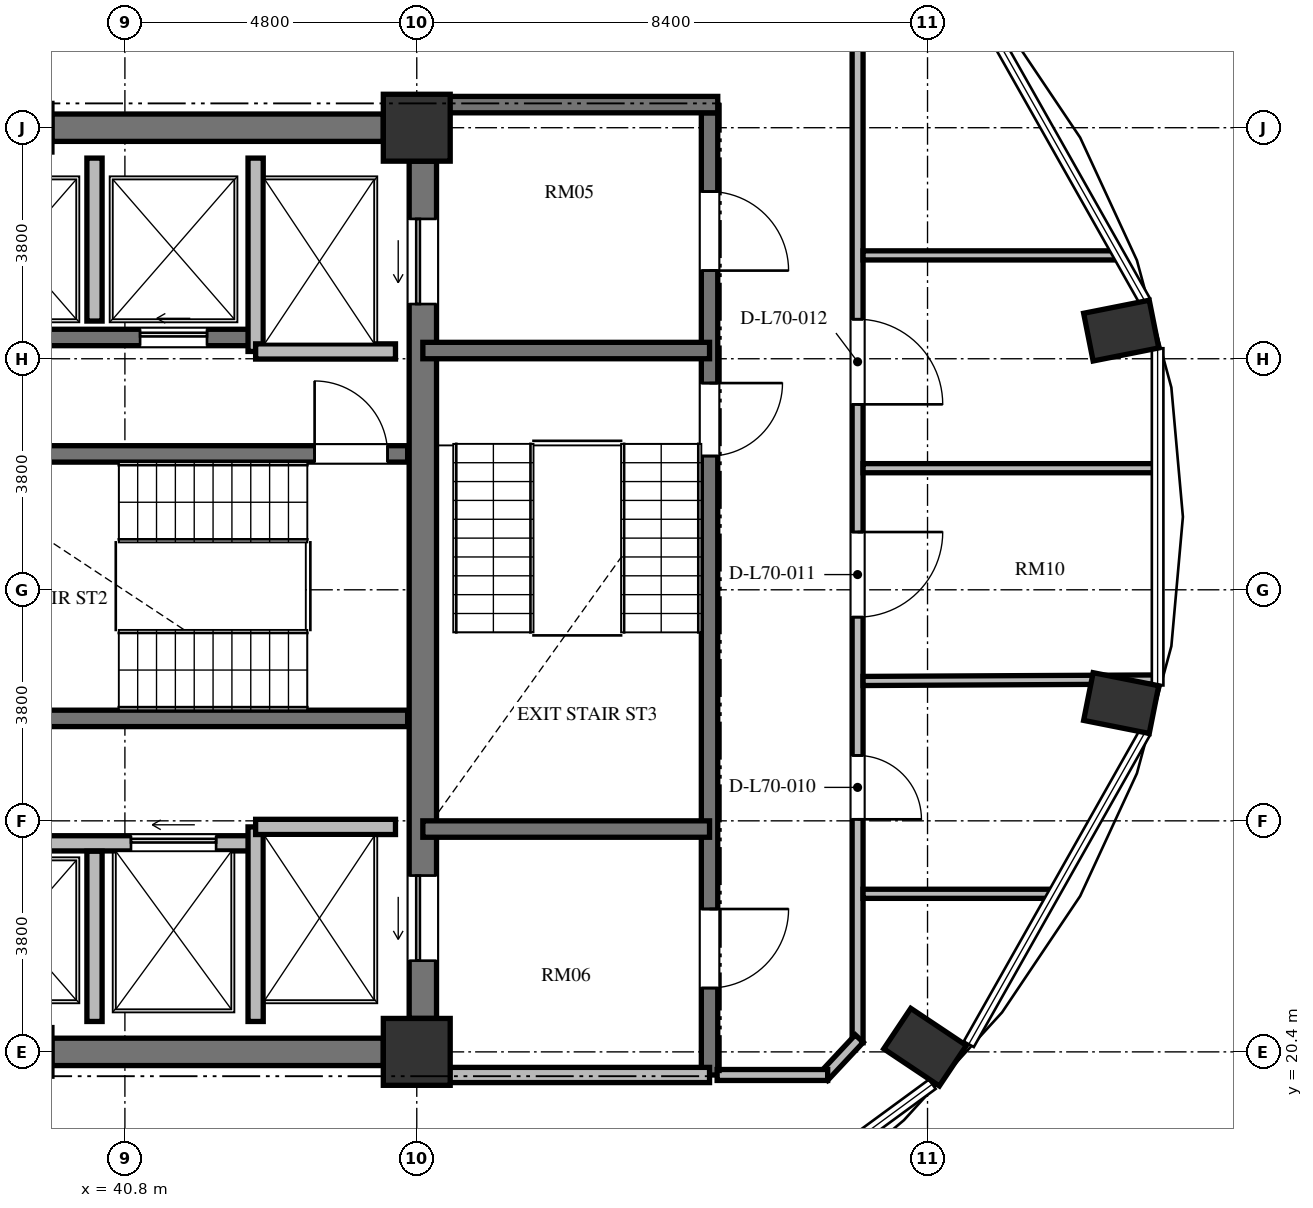
"""IFC4 building model, lengths in metres.
Left out: names, types, materials, properties, quantities, classifications, styles, units other than length and angle.
Written with IfcOpenShell. Run it as: python <this file> out.ifc"""

import sys

from ifc_helpers import new_model, si_unit, direction, frame, frame_2d, origin, origin_2d, place, context, subcontext, project, spatial, rectangle, extrude, element, fill, save


model = new_model("IFC4")
c1 = context("Model", 3, precision=1e-05, world=origin(), true_north=direction((0.0, 1.0)))
c2 = subcontext(c1, "Body", "Model", "MODEL_VIEW")
j1 = project(units=[si_unit("LENGTHUNIT", "METRE"), si_unit("PLANEANGLEUNIT", "RADIAN")], contexts=[c1])
p1 = place(None, origin())
s1 = spatial("IfcSite", under=j1, at=p1, CompositionType="ELEMENT")
p2 = place(p1, origin())
s2 = spatial("IfcBuilding", under=s1, at=p2, CompositionType="ELEMENT")
p3 = place(p2, frame((0.0, 0.0, 269.616)))
s3 = spatial("IfcBuildingStorey", under=s2, at=p3, CompositionType="ELEMENT", Elevation=269.616)
for number, where, z_axis, x_axis in (
    (1, (53.96, 20.478, 0.0), (0.0, 0.0, 1.0), (0.831, -0.556, 0.0)),
    (2, (57.185, 26.137, 0.0), (0.0, 0.0, 1.0), (0.981, -0.195, 0.0)),
    (3, (57.185, 32.263, 0.0), (0.0, 0.0, 1.0), (0.981, 0.195, 0.0)),
):
    element("IfcColumn", number, at=place(p3, frame(where, z_axis=z_axis, x_axis=x_axis)), inside=s3, PredefinedType="COLUMN", context=c2, shape_type="SweptSolid", body=[
        extrude(rectangle(XDim=1.1, YDim=0.8, at=origin_2d()), origin(), (0.0, 0.0, 1.0), 3.648),
    ])
for number, where, z_axis, x_axis in (
    (4, (45.6, 20.4, 0.0), (0.0, 0.0, 1.0), (1.0, 0.0, 0.0)),
    (5, (45.6, 35.6, 0.0), (0.0, 0.0, 1.0), (1.0, 0.0, 0.0)),
):
    element("IfcColumn", number, at=place(p3, frame(where, z_axis=z_axis, x_axis=x_axis)), inside=s3, PredefinedType="COLUMN", context=c2, shape_type="SweptSolid", body=[
        extrude(rectangle(XDim=1.1, YDim=1.1, at=origin_2d()), origin(), (0.0, 0.0, 1.0), 3.648),
    ])
p4 = place(p3, frame((45.7, 20.95, 0.0), z_axis=(0.0, 0.0, 1.0), x_axis=(0.0, 1.0, 0.0)))
e6 = element("IfcWall", 6, at=p4, inside=s3, PredefinedType="SHEAR", context=c2, shape_type="SweptSolid", body=[
    extrude(rectangle(XDim=14.1, YDim=0.45, at=frame_2d((7.05, 0.0))), origin(), (0.0, 0.0, 1.0), 3.648),
])
p5 = place(p4, frame((11.75, 0.0, 0.0)))
e7 = element("IfcOpeningElement", 7, at=p5, cuts=e6, PredefinedType="OPENING", context=c2, shape_type="SweptSolid", body=[
    extrude(rectangle(XDim=1.4, YDim=2.3, at=frame_2d((0.7, 1.15))), frame((0.0, 0.235, 0.0), z_axis=(0.0, -1.0, 0.0), x_axis=(1.0, 0.0, 0.0)), (0.0, 0.0, 1.0), 0.47),
])
p6 = place(p4, frame((0.95, 0.0, 0.0)))
e8 = element("IfcOpeningElement", 8, at=p6, cuts=e6, PredefinedType="OPENING", context=c2, shape_type="SweptSolid", body=[
    extrude(rectangle(XDim=1.4, YDim=2.3, at=frame_2d((0.7, 1.15))), frame((0.0, 0.235, 0.0), z_axis=(0.0, -1.0, 0.0), x_axis=(1.0, 0.0, 0.0)), (0.0, 0.0, 1.0), 0.47),
])
for number, where, z_axis, x_axis in (
    (9, (39.6, 20.4, 0.0), (0.0, 0.0, 1.0), (1.0, 0.0, 0.0)),
    (10, (39.6, 35.6, 0.0), (0.0, 0.0, 1.0), (1.0, 0.0, 0.0)),
):
    element("IfcWall", number, at=place(p3, frame(where, z_axis=z_axis, x_axis=x_axis)), inside=s3, PredefinedType="SHEAR", context=c2, shape_type="SweptSolid", body=[
        extrude(rectangle(XDim=5.45, YDim=0.45, at=frame_2d((2.725, 0.0))), origin(), (0.0, 0.0, 1.0), 3.648),
    ])
p7 = place(p3, frame((37.465, 30.235, 0.0), z_axis=(0.0, 0.0, 1.0), x_axis=(1.0, 0.0, 0.0)))
e11 = element("IfcWall", 11, at=p7, inside=s3, PredefinedType="SHEAR", context=c2, shape_type="SweptSolid", body=[
    extrude(rectangle(XDim=7.985, YDim=0.27, at=frame_2d((3.992, 0.0))), origin(), (0.0, 0.0, 1.0), 3.648),
])
p8 = place(p7, frame((6.455, 0.0, 0.0)))
e12 = element("IfcOpeningElement", 12, at=p8, cuts=e11, PredefinedType="OPENING", context=c2, shape_type="SweptSolid", body=[
    extrude(rectangle(XDim=1.2, YDim=2.15, at=frame_2d((0.6, 1.075))), frame((0.0, 0.145, 0.0), z_axis=(0.0, -1.0, 0.0), x_axis=(1.0, 0.0, 0.0)), (0.0, 0.0, 1.0), 0.29),
])
p9 = place(p3, frame((37.465, 25.885, 0.0), z_axis=(0.0, 0.0, 1.0), x_axis=(1.0, 0.0, 0.0)))
e13 = element("IfcWall", 13, at=p9, inside=s3, PredefinedType="SHEAR", context=c2, shape_type="SweptSolid", body=[
    extrude(rectangle(XDim=7.985, YDim=0.27, at=frame_2d((3.992, 0.0))), origin(), (0.0, 0.0, 1.0), 3.648),
])
p10 = place(p3, frame((26.55, 32.15, 0.0), z_axis=(0.0, 0.0, 1.0), x_axis=(1.0, 0.0, 0.0)))
e14 = element("IfcWall", 14, at=p10, inside=s3, PredefinedType="SHEAR", context=c2, shape_type="SweptSolid", body=[
    extrude(rectangle(XDim=16.4, YDim=0.27, at=frame_2d((8.2, 0.0))), origin(), (0.0, 0.0, 1.0), 3.648),
])
p11 = place(p10, frame((5.125, 0.0, 0.0)))
e15 = element("IfcOpeningElement", 15, at=p11, cuts=e14, PredefinedType="OPENING", context=c2, shape_type="SweptSolid", body=[
    extrude(rectangle(XDim=1.05, YDim=2.15, at=frame_2d((0.525, 1.075))), frame((0.0, 0.145, 0.0), z_axis=(0.0, -1.0, 0.0), x_axis=(1.0, 0.0, 0.0)), (0.0, 0.0, 1.0), 0.29),
])
p12 = place(p10, frame((11.9, 0.0, 0.0)))
e16 = element("IfcOpeningElement", 16, at=p12, cuts=e14, PredefinedType="OPENING", context=c2, shape_type="SweptSolid", body=[
    extrude(rectangle(XDim=1.1, YDim=2.2, at=frame_2d((0.55, 1.1))), frame((0.0, 0.145, 0.0), z_axis=(0.0, -1.0, 0.0), x_axis=(1.0, 0.0, 0.0)), (0.0, 0.0, 1.0), 0.29),
])
p13 = place(p10, frame((14.5, 0.0, 0.0)))
e17 = element("IfcOpeningElement", 17, at=p13, cuts=e14, PredefinedType="OPENING", context=c2, shape_type="SweptSolid", body=[
    extrude(rectangle(XDim=1.1, YDim=2.2, at=frame_2d((0.55, 1.1))), frame((0.0, 0.145, 0.0), z_axis=(0.0, -1.0, 0.0), x_axis=(1.0, 0.0, 0.0)), (0.0, 0.0, 1.0), 0.29),
])
p14 = place(p3, frame((26.75, 23.83, 0.0), z_axis=(0.0, 0.0, 1.0), x_axis=(1.0, 0.0, 0.0)))
e18 = element("IfcWall", 18, at=p14, inside=s3, PredefinedType="SOLIDWALL", context=c2, shape_type="SweptSolid", body=[
    extrude(rectangle(XDim=16.2, YDim=0.25, at=frame_2d((8.1, 0.0))), origin(), (0.0, 0.0, 1.0), 3.448),
])
p15 = place(p14, frame((4.75, 0.0, 0.0)))
e19 = element("IfcOpeningElement", 19, at=p15, cuts=e18, PredefinedType="OPENING", context=c2, shape_type="SweptSolid", body=[
    extrude(rectangle(XDim=1.4, YDim=2.2, at=frame_2d((0.7, 1.1))), frame((0.0, 0.135, 0.0), z_axis=(0.0, -1.0, 0.0), x_axis=(1.0, 0.0, 0.0)), (0.0, 0.0, 1.0), 0.27),
])
p16 = place(p14, frame((11.7, 0.0, 0.0)))
e20 = element("IfcOpeningElement", 20, at=p16, cuts=e18, PredefinedType="OPENING", context=c2, shape_type="SweptSolid", body=[
    extrude(rectangle(XDim=1.1, YDim=2.2, at=frame_2d((0.55, 1.1))), frame((0.0, 0.135, 0.0), z_axis=(0.0, -1.0, 0.0), x_axis=(1.0, 0.0, 0.0)), (0.0, 0.0, 1.0), 0.27),
])
p17 = place(p14, frame((14.15, 0.0, 0.0)))
e21 = element("IfcOpeningElement", 21, at=p17, cuts=e18, PredefinedType="OPENING", context=c2, shape_type="SweptSolid", body=[
    extrude(rectangle(XDim=1.4, YDim=2.3, at=frame_2d((0.7, 1.15))), frame((0.0, 0.135, 0.0), z_axis=(0.0, -1.0, 0.0), x_axis=(1.0, 0.0, 0.0)), (0.0, 0.0, 1.0), 0.27),
])
p18 = place(p3, frame((42.95, 31.92, 0.0), z_axis=(0.0, 0.0, 1.0), x_axis=(0.0, 1.0, 0.0)))
e22 = element("IfcWall", 22, at=p18, inside=s3, PredefinedType="SOLIDWALL", context=c2, shape_type="SweptSolid", body=[
    extrude(rectangle(XDim=3.18, YDim=0.25, at=frame_2d((1.59, 0.0))), origin(), (0.0, 0.0, 1.0), 3.448),
])
p19 = place(p3, frame((42.95, 31.92, 0.0), z_axis=(0.0, 0.0, 1.0), x_axis=(1.0, 0.0, 0.0)))
e23 = element("IfcWall", 23, at=p19, inside=s3, PredefinedType="SOLIDWALL", context=c2, shape_type="SweptSolid", body=[
    extrude(rectangle(XDim=2.3, YDim=0.25, at=frame_2d((1.15, 0.0))), origin(), (0.0, 0.0, 1.0), 3.448),
])
p20 = place(p3, frame((42.95, 20.9, 0.0), z_axis=(0.0, 0.0, 1.0), x_axis=(0.0, 1.0, 0.0)))
e24 = element("IfcWall", 24, at=p20, inside=s3, PredefinedType="SOLIDWALL", context=c2, shape_type="SweptSolid", body=[
    extrude(rectangle(XDim=3.2, YDim=0.25, at=frame_2d((1.6, 0.0))), origin(), (0.0, 0.0, 1.0), 3.448),
])
p21 = place(p3, frame((42.95, 24.1, 0.0), z_axis=(0.0, 0.0, 1.0), x_axis=(1.0, 0.0, 0.0)))
e25 = element("IfcWall", 25, at=p21, inside=s3, PredefinedType="SOLIDWALL", context=c2, shape_type="SweptSolid", body=[
    extrude(rectangle(XDim=2.3, YDim=0.25, at=frame_2d((1.15, 0.0))), origin(), (0.0, 0.0, 1.0), 3.448),
])
p22 = place(p3, frame((40.3, 32.42, 0.0), z_axis=(0.0, 0.0, 1.0), x_axis=(0.0, 1.0, 0.0)))
e26 = element("IfcWall", 26, at=p22, inside=s3, PredefinedType="SOLIDWALL", context=c2, shape_type="SweptSolid", body=[
    extrude(rectangle(XDim=2.68, YDim=0.25, at=frame_2d((1.34, 0.0))), origin(), (0.0, 0.0, 1.0), 3.448),
])
p23 = place(p3, frame((40.3, 20.9, 0.0), z_axis=(0.0, 0.0, 1.0), x_axis=(0.0, 1.0, 0.0)))
e27 = element("IfcWall", 27, at=p23, inside=s3, PredefinedType="SOLIDWALL", context=c2, shape_type="SweptSolid", body=[
    extrude(rectangle(XDim=2.8, YDim=0.25, at=frame_2d((1.4, 0.0))), origin(), (0.0, 0.0, 1.0), 3.448),
])
p24 = place(p3, frame((50.415, 35.845, 0.0), z_axis=(0.0, 0.0, 1.0), x_axis=(0.0, -1.0, 0.0)))
e28 = element("IfcWall", 28, at=p24, inside=s3, PredefinedType="SHEAR", context=c2, shape_type="SweptSolid", body=[
    extrude(rectangle(XDim=15.825, YDim=0.27, at=frame_2d((7.913, 0.0))), origin(), (0.0, 0.0, 1.0), 3.648),
])
p25 = place(p24, frame((4.445, 0.0, 0.0)))
e29 = element("IfcOpeningElement", 29, at=p25, cuts=e28, PredefinedType="OPENING", context=c2, shape_type="SweptSolid", body=[
    extrude(rectangle(XDim=1.2, YDim=2.15, at=frame_2d((0.6, 1.075))), frame((0.0, 0.145, 0.0), z_axis=(0.0, -1.0, 0.0), x_axis=(1.0, 0.0, 0.0)), (0.0, 0.0, 1.0), 0.29),
])
p26 = place(p24, frame((1.295, 0.0, 0.0)))
e30 = element("IfcOpeningElement", 30, at=p26, cuts=e28, PredefinedType="OPENING", context=c2, shape_type="SweptSolid", body=[
    extrude(rectangle(XDim=1.3, YDim=2.2, at=frame_2d((0.65, 1.1))), frame((0.0, 0.145, 0.0), z_axis=(0.0, -1.0, 0.0), x_axis=(1.0, 0.0, 0.0)), (0.0, 0.0, 1.0), 0.29),
])
p27 = place(p24, frame((13.095, 0.0, 0.0)))
e31 = element("IfcOpeningElement", 31, at=p27, cuts=e28, PredefinedType="OPENING", context=c2, shape_type="SweptSolid", body=[
    extrude(rectangle(XDim=1.3, YDim=2.2, at=frame_2d((0.65, 1.1))), frame((0.0, 0.145, 0.0), z_axis=(0.0, -1.0, 0.0), x_axis=(1.0, 0.0, 0.0)), (0.0, 0.0, 1.0), 0.29),
])
p28 = place(p3, frame((45.925, 35.98, 0.0), z_axis=(0.0, 0.0, 1.0), x_axis=(1.0, 0.0, 0.0)))
e32 = element("IfcWall", 32, at=p28, inside=s3, PredefinedType="SHEAR", context=c2, shape_type="SweptSolid", body=[
    extrude(rectangle(XDim=4.625, YDim=0.27, at=frame_2d((2.312, 0.0))), origin(), (0.0, 0.0, 1.0), 3.648),
])
for number, where, z_axis, x_axis in (
    (33, (45.7, 31.935, 0.0), (0.0, 0.0, 1.0), (1.0, 0.0, 0.0)),
    (34, (45.7, 24.065, 0.0), (0.0, 0.0, 1.0), (1.0, 0.0, 0.0)),
):
    element("IfcWall", number, at=place(p3, frame(where, z_axis=z_axis, x_axis=x_axis)), inside=s3, PredefinedType="SHEAR", context=c2, shape_type="SweptSolid", body=[
        extrude(rectangle(XDim=4.715, YDim=0.27, at=frame_2d((2.357, 0.0))), origin(), (0.0, 0.0, 1.0), 3.648),
    ])
p29 = place(p3, frame((45.7, 20.02, 0.0), z_axis=(0.0, 0.0, 1.0), x_axis=(1.0, 0.0, 0.0)))
e35 = element("IfcWall", 35, at=p29, inside=s3, PredefinedType="SOLIDWALL", context=c2, shape_type="SweptSolid", body=[
    extrude(rectangle(XDim=4.715, YDim=0.25, at=frame_2d((2.357, 0.0))), origin(), (0.0, 0.0, 1.0), 3.448),
])
p30 = place(p3, frame((52.85, 37.85, 0.0), z_axis=(0.0, 0.0, 1.0), x_axis=(0.0, -1.0, 0.0)))
e36 = element("IfcWall", 36, at=p30, inside=s3, PredefinedType="PARTITIONING", context=c2, shape_type="SweptSolid", body=[
    extrude(rectangle(XDim=17.3, YDim=0.18, at=frame_2d((8.65, 0.0))), origin(), (0.0, 0.0, 1.0), 3.448),
])
p31 = place(p30, frame((12.575, 0.0, 0.0)))
e37 = element("IfcOpeningElement", 37, at=p31, cuts=e36, PredefinedType="OPENING", context=c2, shape_type="SweptSolid", body=[
    extrude(rectangle(XDim=1.05, YDim=2.15, at=frame_2d((0.525, 1.075))), frame((0.0, 0.1, 0.0), z_axis=(0.0, -1.0, 0.0), x_axis=(1.0, 0.0, 0.0)), (0.0, 0.0, 1.0), 0.2),
])
p32 = place(p30, frame((8.9, 0.0, 0.0)))
e38 = element("IfcOpeningElement", 38, at=p32, cuts=e36, PredefinedType="OPENING", context=c2, shape_type="SweptSolid", body=[
    extrude(rectangle(XDim=1.4, YDim=2.2, at=frame_2d((0.7, 1.1))), frame((0.0, 0.1, 0.0), z_axis=(0.0, -1.0, 0.0), x_axis=(1.0, 0.0, 0.0)), (0.0, 0.0, 1.0), 0.2),
])
p33 = place(p30, frame((5.4, 0.0, 0.0)))
e39 = element("IfcOpeningElement", 39, at=p33, cuts=e36, PredefinedType="OPENING", context=c2, shape_type="SweptSolid", body=[
    extrude(rectangle(XDim=1.4, YDim=2.2, at=frame_2d((0.7, 1.1))), frame((0.0, 0.1, 0.0), z_axis=(0.0, -1.0, 0.0), x_axis=(1.0, 0.0, 0.0)), (0.0, 0.0, 1.0), 0.2),
])
p34 = place(p3, frame((52.877, 20.619, 0.0), z_axis=(0.0, 0.0, 1.0), x_axis=(-0.682409308253, -0.730970270264, 0.0)))
e40 = element("IfcWall", 40, at=p34, inside=s3, PredefinedType="PARTITIONING", context=c2, shape_type="SweptSolid", body=[
    extrude(rectangle(XDim=0.86, YDim=0.18, at=frame_2d((0.43, 0.0))), origin(), (0.0, 0.0, 1.0), 3.448),
])
p35 = place(p3, frame((52.358, 20.02, 0.0), z_axis=(0.0, 0.0, 1.0), x_axis=(-1.0, 0.0, 0.0)))
e41 = element("IfcWall", 41, at=p35, inside=s3, PredefinedType="PARTITIONING", context=c2, shape_type="SweptSolid", body=[
    extrude(rectangle(XDim=1.818, YDim=0.18, at=frame_2d((0.909, 0.0))), origin(), (0.0, 0.0, 1.0), 3.448),
])
p36 = place(p3, frame((52.94, 23.0, 0.0), z_axis=(0.0, 0.0, 1.0), x_axis=(1.0, 0.0, 0.0)))
e42 = element("IfcWall", 42, at=p36, inside=s3, PredefinedType="PARTITIONING", context=c2, shape_type="SweptSolid", body=[
    extrude(rectangle(XDim=3.126, YDim=0.15, at=frame_2d((1.563, 0.0))), origin(), (0.0, 0.0, 1.0), 3.448),
])
p37 = place(p3, frame((52.94, 26.5, 0.0), z_axis=(0.0, 0.0, 1.0), x_axis=(0.999987566883, 0.004986589892, 0.0)))
e43 = element("IfcWall", 43, at=p37, inside=s3, PredefinedType="PARTITIONING", context=c2, shape_type="SweptSolid", body=[
    extrude(rectangle(XDim=4.847, YDim=0.15, at=frame_2d((2.423, 0.0))), origin(), (0.0, 0.0, 1.0), 3.448),
])
p38 = place(p3, frame((52.94, 30.0, 0.0), z_axis=(0.0, 0.0, 1.0), x_axis=(1.0, 0.0, 0.0)))
e44 = element("IfcWall", 44, at=p38, inside=s3, PredefinedType="PARTITIONING", context=c2, shape_type="SweptSolid", body=[
    extrude(rectangle(XDim=4.832, YDim=0.15, at=frame_2d((2.416, 0.0))), origin(), (0.0, 0.0, 1.0), 3.448),
])
p39 = place(p3, frame((52.94, 33.5, 0.0), z_axis=(0.0, 0.0, 1.0), x_axis=(1.0, 0.0, 0.0)))
e45 = element("IfcWall", 45, at=p39, inside=s3, PredefinedType="PARTITIONING", context=c2, shape_type="SweptSolid", body=[
    extrude(rectangle(XDim=4.199, YDim=0.15, at=frame_2d((2.1, 0.0))), origin(), (0.0, 0.0, 1.0), 3.448),
])
p40 = place(p8, origin())
e46 = element("IfcDoor", 46, at=p40, inside=s3, OperationType="SINGLE_SWING_LEFT", PredefinedType="DOOR", context=c2, shape_type="SweptSolid", body=[
    extrude(rectangle(XDim=1.2, YDim=2.15, at=frame_2d((0.6, 1.075))), frame((0.0, 0.025, 0.0), z_axis=(0.0, -1.0, 0.0), x_axis=(1.0, 0.0, 0.0)), (0.0, 0.0, 1.0), 0.05),
])
fill(e12, e46)
p41 = place(p13, origin())
e47 = element("IfcDoor", 47, at=p41, inside=s3, OperationType="SLIDING_TO_LEFT", PredefinedType="DOOR", context=c2, shape_type="SweptSolid", body=[
    extrude(rectangle(XDim=1.1, YDim=2.2, at=frame_2d((0.55, 1.1))), frame((0.0, 0.025, 0.0), z_axis=(0.0, -1.0, 0.0), x_axis=(1.0, 0.0, 0.0)), (0.0, 0.0, 1.0), 0.05),
])
fill(e17, e47)
p42 = place(p5, origin())
e48 = element("IfcDoor", 48, at=p42, inside=s3, OperationType="SLIDING_TO_LEFT", PredefinedType="DOOR", context=c2, shape_type="SweptSolid", body=[
    extrude(rectangle(XDim=1.4, YDim=2.3, at=frame_2d((0.7, 1.15))), frame((0.0, 0.025, 0.0), z_axis=(0.0, -1.0, 0.0), x_axis=(1.0, 0.0, 0.0)), (0.0, 0.0, 1.0), 0.05),
])
fill(e7, e48)
p43 = place(p6, origin())
e49 = element("IfcDoor", 49, at=p43, inside=s3, OperationType="SLIDING_TO_LEFT", PredefinedType="DOOR", context=c2, shape_type="SweptSolid", body=[
    extrude(rectangle(XDim=1.4, YDim=2.3, at=frame_2d((0.7, 1.15))), frame((0.0, 0.025, 0.0), z_axis=(0.0, -1.0, 0.0), x_axis=(1.0, 0.0, 0.0)), (0.0, 0.0, 1.0), 0.05),
])
fill(e8, e49)
p44 = place(p17, origin())
e50 = element("IfcDoor", 50, at=p44, inside=s3, OperationType="SLIDING_TO_LEFT", PredefinedType="DOOR", context=c2, shape_type="SweptSolid", body=[
    extrude(rectangle(XDim=1.4, YDim=2.3, at=frame_2d((0.7, 1.15))), frame((0.0, 0.025, 0.0), z_axis=(0.0, -1.0, 0.0), x_axis=(1.0, 0.0, 0.0)), (0.0, 0.0, 1.0), 0.05),
])
fill(e21, e50)
p45 = place(p25, origin())
e51 = element("IfcDoor", 51, at=p45, inside=s3, OperationType="SINGLE_SWING_LEFT", PredefinedType="DOOR", context=c2, shape_type="SweptSolid", body=[
    extrude(rectangle(XDim=1.2, YDim=2.15, at=frame_2d((0.6, 1.075))), frame((0.0, 0.025, 0.0), z_axis=(0.0, -1.0, 0.0), x_axis=(1.0, 0.0, 0.0)), (0.0, 0.0, 1.0), 0.05),
])
fill(e29, e51)
p46 = place(p26, origin())
e52 = element("IfcDoor", 52, at=p46, inside=s3, OperationType="SINGLE_SWING_RIGHT", PredefinedType="DOOR", context=c2, shape_type="SweptSolid", body=[
    extrude(rectangle(XDim=1.3, YDim=2.2, at=frame_2d((0.65, 1.1))), frame((0.0, 0.025, 0.0), z_axis=(0.0, -1.0, 0.0), x_axis=(1.0, 0.0, 0.0)), (0.0, 0.0, 1.0), 0.05),
])
fill(e30, e52)
p47 = place(p27, origin())
e53 = element("IfcDoor", 53, at=p47, inside=s3, OperationType="SINGLE_SWING_LEFT", PredefinedType="DOOR", context=c2, shape_type="SweptSolid", body=[
    extrude(rectangle(XDim=1.3, YDim=2.2, at=frame_2d((0.65, 1.1))), frame((0.0, 0.025, 0.0), z_axis=(0.0, -1.0, 0.0), x_axis=(1.0, 0.0, 0.0)), (0.0, 0.0, 1.0), 0.05),
])
fill(e31, e53)
p48 = place(p31, origin())
e54 = element("IfcDoor", 54, at=p48, inside=s3, OperationType="SINGLE_SWING_RIGHT", PredefinedType="DOOR", context=c2, shape_type="SweptSolid", body=[
    extrude(rectangle(XDim=1.05, YDim=2.15, at=frame_2d((0.525, 1.075))), frame((0.0, 0.025, 0.0), z_axis=(0.0, -1.0, 0.0), x_axis=(1.0, 0.0, 0.0)), (0.0, 0.0, 1.0), 0.05),
])
fill(e37, e54)
p49 = place(p32, origin())
e55 = element("IfcDoor", 55, at=p49, inside=s3, OperationType="SINGLE_SWING_LEFT", PredefinedType="DOOR", context=c2, shape_type="SweptSolid", body=[
    extrude(rectangle(XDim=1.4, YDim=2.2, at=frame_2d((0.7, 1.1))), frame((0.0, 0.025, 0.0), z_axis=(0.0, -1.0, 0.0), x_axis=(1.0, 0.0, 0.0)), (0.0, 0.0, 1.0), 0.05),
])
fill(e38, e55)
p50 = place(p33, origin())
e56 = element("IfcDoor", 56, at=p50, inside=s3, OperationType="SINGLE_SWING_RIGHT", PredefinedType="DOOR", context=c2, shape_type="SweptSolid", body=[
    extrude(rectangle(XDim=1.4, YDim=2.2, at=frame_2d((0.7, 1.1))), frame((0.0, 0.025, 0.0), z_axis=(0.0, -1.0, 0.0), x_axis=(1.0, 0.0, 0.0)), (0.0, 0.0, 1.0), 0.05),
])
fill(e39, e56)
save(model, sys.argv[1])
